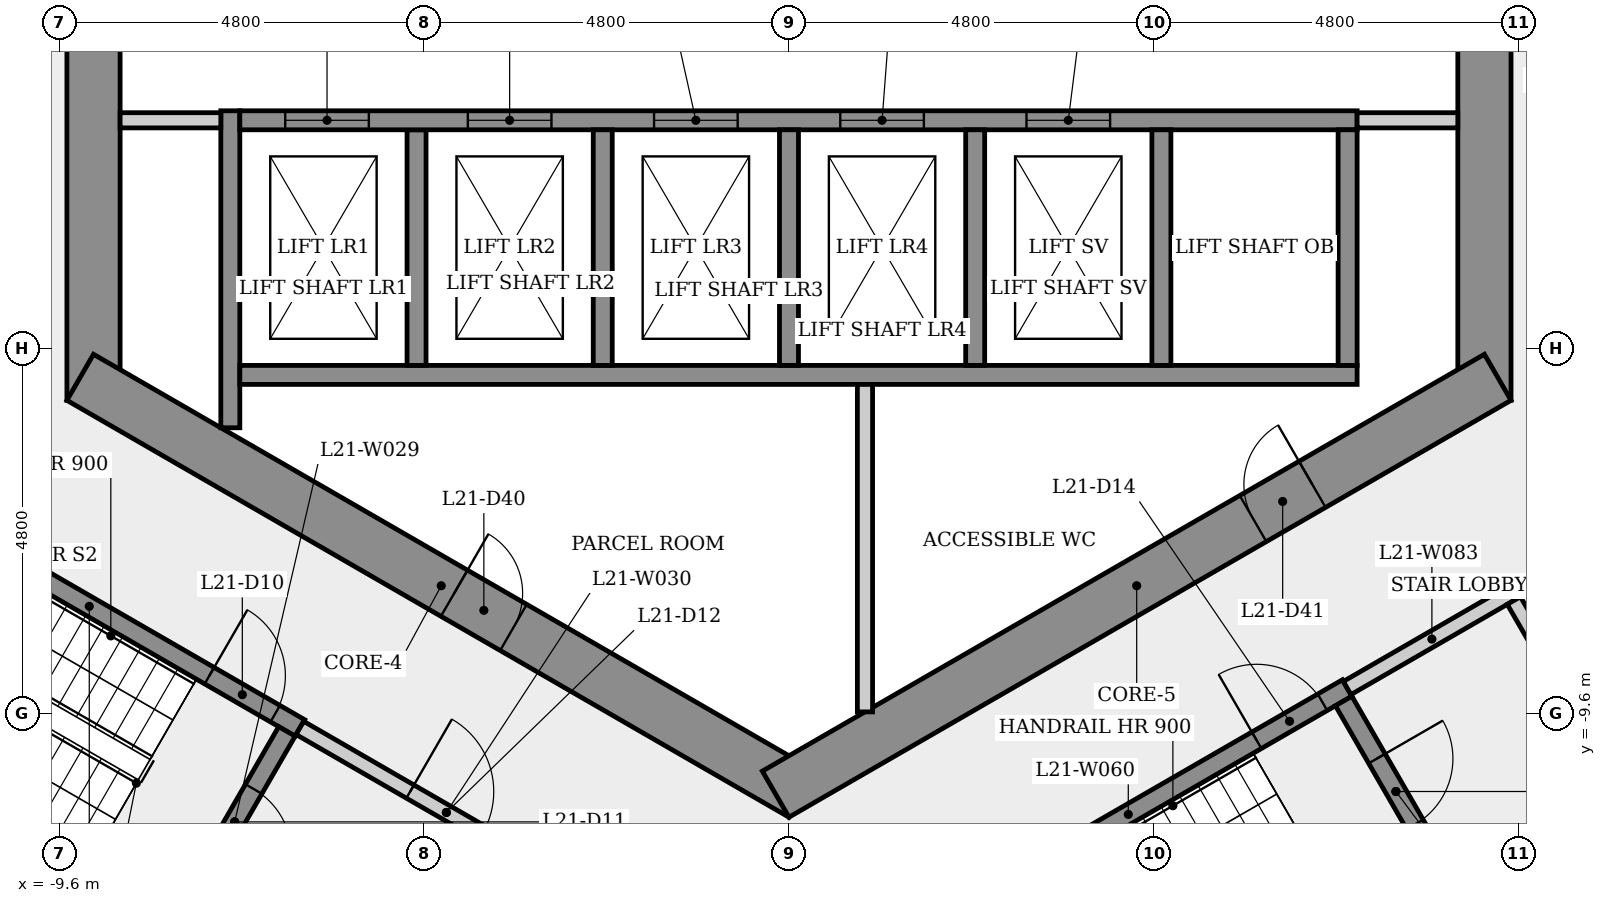
"""IFC4 building model, lengths in metres.
Left out: names, types, materials, properties, quantities, classifications, styles, units other than length and angle.
Written with IfcOpenShell. Run it as: python <this file> out.ifc"""

import sys

from ifc_helpers import new_model, si_unit, direction, frame, frame_2d, origin, place, context, subcontext, project, spatial, rectangle, extrude, element, fill, save


model = new_model("IFC4")
c1 = context("Model", 3, precision=1e-05, world=origin(), true_north=direction((0.0, 1.0)))
c2 = subcontext(c1, "Body", "Model", "MODEL_VIEW")
j1 = project(units=[si_unit("LENGTHUNIT", "METRE"), si_unit("PLANEANGLEUNIT", "RADIAN")], contexts=[c1])
p1 = place(None, origin())
s1 = spatial("IfcSite", under=j1, at=p1, CompositionType="ELEMENT")
p2 = place(p1, origin())
s2 = spatial("IfcBuilding", under=s1, at=p2, CompositionType="ELEMENT")
p3 = place(p2, frame((0.0, 0.0, 83.1)))
s3 = spatial("IfcBuildingStorey", under=s2, at=p3, CompositionType="ELEMENT", Elevation=83.1)
p4 = place(p3, frame((9.15, -5.485, 0.0), z_axis=(0.0, 0.0, 1.0), x_axis=(0.0, 1.0, 0.0)))
e1 = element("IfcWall", 1, at=p4, inside=s3, PredefinedType="SHEAR", context=c2, shape_type="SweptSolid", body=[
    extrude(rectangle(XDim=10.97, YDim=0.7, at=frame_2d((5.485, 0.0))), origin(), (0.0, 0.0, 1.0), 3.4),
])
p5 = place(p4, frame((4.685, 0.0, 0.0)))
e2 = element("IfcOpeningElement", 2, at=p5, cuts=e1, PredefinedType="OPENING", context=c2, shape_type="SweptSolid", body=[
    extrude(rectangle(XDim=1.6, YDim=2.1, at=frame_2d((0.8, 1.05))), frame((0.0, 0.36, 0.0), z_axis=(0.0, -1.0, 0.0), x_axis=(1.0, 0.0, 0.0)), (0.0, 0.0, 1.0), 0.72),
])
p6 = place(p3, frame((-9.15, 5.485, 0.0), z_axis=(0.0, 0.0, 1.0), x_axis=(0.0, -1.0, 0.0)))
e3 = element("IfcWall", 3, at=p6, inside=s3, PredefinedType="SHEAR", context=c2, shape_type="SweptSolid", body=[
    extrude(rectangle(XDim=10.97, YDim=0.7, at=frame_2d((5.485, 0.0))), origin(), (0.0, 0.0, 1.0), 3.4),
])
p7 = place(p6, frame((4.685, 0.0, 0.0)))
e4 = element("IfcOpeningElement", 4, at=p7, cuts=e3, PredefinedType="OPENING", context=c2, shape_type="SweptSolid", body=[
    extrude(rectangle(XDim=1.6, YDim=2.1, at=frame_2d((0.8, 1.05))), frame((0.0, 0.36, 0.0), z_axis=(0.0, -1.0, 0.0), x_axis=(1.0, 0.0, 0.0)), (0.0, 0.0, 1.0), 0.72),
])
p8 = place(p3, frame((-9.325, -5.182, 0.0), z_axis=(0.0, 0.0, 1.0), x_axis=(0.866023993627, -0.500002442456, 0.0)))
e5 = element("IfcWall", 5, at=p8, inside=s3, PredefinedType="SHEAR", context=c2, shape_type="SweptSolid", body=[
    extrude(rectangle(XDim=10.97, YDim=0.7, at=frame_2d((5.485, 0.0))), origin(), (0.0, 0.0, 1.0), 3.4),
])
p9 = place(p8, frame((5.682, 0.0, 0.0)))
e6 = element("IfcOpeningElement", 6, at=p9, cuts=e5, PredefinedType="OPENING", context=c2, shape_type="SweptSolid", body=[
    extrude(rectangle(XDim=0.9, YDim=2.1, at=frame_2d((0.45, 1.05))), frame((0.0, 0.36, 0.0), z_axis=(0.0, -1.0, 0.0), x_axis=(1.0, 0.0, 0.0)), (0.0, 0.0, 1.0), 0.72),
])
p10 = place(p3, frame((-0.175, -10.667, 0.0), z_axis=(0.0, 0.0, 1.0), x_axis=(0.866023993627, 0.500002442456, 0.0)))
e7 = element("IfcWall", 7, at=p10, inside=s3, PredefinedType="SHEAR", context=c2, shape_type="SweptSolid", body=[
    extrude(rectangle(XDim=10.97, YDim=0.7, at=frame_2d((5.485, 0.0))), origin(), (0.0, 0.0, 1.0), 3.4),
])
p11 = place(p10, frame((7.252, 0.0, 0.0)))
e8 = element("IfcOpeningElement", 8, at=p11, cuts=e7, PredefinedType="OPENING", context=c2, shape_type="SweptSolid", body=[
    extrude(rectangle(XDim=0.9, YDim=2.1, at=frame_2d((0.45, 1.05))), frame((0.0, 0.36, 0.0), z_axis=(0.0, -1.0, 0.0), x_axis=(1.0, 0.0, 0.0)), (0.0, 0.0, 1.0), 0.72),
])
p12 = place(p3, frame((-11.977, -6.595, 0.0), z_axis=(0.0, 0.0, 1.0), x_axis=(0.866025499775, -0.499999833739, 0.0)))
e9 = element("IfcWall", 9, at=p12, inside=s3, PredefinedType="SHEAR", context=c2, shape_type="SweptSolid", body=[
    extrude(rectangle(XDim=6.4, YDim=0.25, at=frame_2d((3.2, 0.0))), origin(), (0.0, 0.0, 1.0), 3.05),
])
p13 = place(p12, frame((5.025, 0.0, 0.0)))
e10 = element("IfcOpeningElement", 10, at=p13, cuts=e9, PredefinedType="OPENING", context=c2, shape_type="SweptSolid", body=[
    extrude(rectangle(XDim=1.0, YDim=2.1, at=frame_2d((0.5, 1.05))), frame((0.0, 0.135, 0.0), z_axis=(0.0, -1.0, 0.0), x_axis=(1.0, 0.0, 0.0)), (0.0, 0.0, 1.0), 0.27),
])
p14 = place(p3, frame((-7.935, -12.393, 0.0), z_axis=(0.0, 0.0, 1.0), x_axis=(-0.866025499775, 0.499999833739, 0.0)))
e11 = element("IfcWall", 11, at=p14, inside=s3, PredefinedType="SHEAR", context=c2, shape_type="SweptSolid", body=[
    extrude(rectangle(XDim=6.4, YDim=0.25, at=frame_2d((3.2, 0.0))), origin(), (0.0, 0.0, 1.0), 3.05),
])
p15 = place(p3, frame((-7.35, -5.846, 0.0), z_axis=(0.0, 0.0, 1.0), x_axis=(0.0, 1.0, 0.0)))
e12 = element("IfcWall", 12, at=p15, inside=s3, PredefinedType="SHEAR", context=c2, shape_type="SweptSolid", body=[
    extrude(rectangle(XDim=4.171, YDim=0.25, at=frame_2d((2.085, 0.0))), origin(), (0.0, 0.0, 1.0), 3.05),
])
p16 = place(p3, frame((-7.475, -1.8, 0.0), z_axis=(0.0, 0.0, 1.0), x_axis=(-1.0, 0.0, 0.0)))
e13 = element("IfcWall", 13, at=p16, inside=s3, PredefinedType="PARTITIONING", context=c2, shape_type="SweptSolid", body=[
    extrude(rectangle(XDim=1.325, YDim=0.2, at=frame_2d((0.663, 0.0))), origin(), (0.0, 0.0, 1.0), 3.05),
])
p17 = place(p3, frame((-6.605, -9.841, 0.0), z_axis=(0.0, 0.0, 1.0), x_axis=(-0.499996545922, -0.866027397988, 0.0)))
e14 = element("IfcWall", 14, at=p17, inside=s3, PredefinedType="SHEAR", context=c2, shape_type="SweptSolid", body=[
    extrude(rectangle(XDim=2.75, YDim=0.25, at=frame_2d((1.375, 0.0))), origin(), (0.0, 0.0, 1.0), 3.05),
])
p18 = place(p17, frame((0.875, 0.0, 0.0)))
e15 = element("IfcOpeningElement", 15, at=p18, cuts=e14, PredefinedType="OPENING", context=c2, shape_type="SweptSolid", body=[
    extrude(rectangle(XDim=1.0, YDim=2.1, at=frame_2d((0.5, 1.05))), frame((0.0, 0.135, 0.0), z_axis=(0.0, -1.0, 0.0), x_axis=(1.0, 0.0, 0.0)), (0.0, 0.0, 1.0), 0.27),
])
p19 = place(p3, frame((-6.435, -9.795, 0.0), z_axis=(0.0, 0.0, 1.0), x_axis=(0.866012907634, -0.500021643343, 0.0)))
e16 = element("IfcWall", 16, at=p19, inside=s3, PredefinedType="PARTITIONING", context=c2, shape_type="SweptSolid", body=[
    extrude(rectangle(XDim=4.45, YDim=0.2, at=frame_2d((2.225, 0.0))), origin(), (0.0, 0.0, 1.0), 3.05),
])
p20 = place(p19, frame((1.675, 0.0, 0.0)))
e17 = element("IfcOpeningElement", 17, at=p20, cuts=e16, PredefinedType="OPENING", context=c2, shape_type="SweptSolid", body=[
    extrude(rectangle(XDim=1.1, YDim=2.1, at=frame_2d((0.55, 1.05))), frame((0.0, 0.11, 0.0), z_axis=(0.0, -1.0, 0.0), x_axis=(1.0, 0.0, 0.0)), (0.0, 0.0, 1.0), 0.22),
])
p21 = place(p3, frame((-7.225, -5.15, 0.0), z_axis=(0.0, 0.0, 1.0), x_axis=(1.0, 0.0, 0.0)))
e18 = element("IfcWall", 18, at=p21, inside=s3, PredefinedType="SHEAR", context=c2, shape_type="SweptSolid", body=[
    extrude(rectangle(XDim=14.7, YDim=0.25, at=frame_2d((7.35, 0.0))), origin(), (0.0, 0.0, 1.0), 3.05),
])
p22 = place(p3, frame((-4.9, -1.925, 0.0), z_axis=(0.0, 0.0, 1.0), x_axis=(0.0, -1.0, 0.0)))
e19 = element("IfcWall", 19, at=p22, inside=s3, PredefinedType="SHEAR", context=c2, shape_type="SweptSolid", body=[
    extrude(rectangle(XDim=3.1, YDim=0.25, at=frame_2d((1.55, 0.0))), origin(), (0.0, 0.0, 1.0), 3.4),
])
p23 = place(p3, frame((-7.225, -1.8, 0.0), z_axis=(0.0, 0.0, 1.0), x_axis=(1.0, 0.0, 0.0)))
e20 = element("IfcWall", 20, at=p23, inside=s3, PredefinedType="SHEAR", context=c2, shape_type="SweptSolid", body=[
    extrude(rectangle(XDim=14.7, YDim=0.25, at=frame_2d((7.35, 0.0))), origin(), (0.0, 0.0, 1.0), 3.05),
])
p24 = place(p23, frame((0.597, 0.0, 0.0)))
e21 = element("IfcOpeningElement", 21, at=p24, cuts=e20, PredefinedType="OPENING", context=c2, shape_type="SweptSolid", body=[
    extrude(rectangle(XDim=1.1, YDim=2.1, at=frame_2d((0.55, 1.05))), frame((0.0, 0.135, 0.0), z_axis=(0.0, -1.0, 0.0), x_axis=(1.0, 0.0, 0.0)), (0.0, 0.0, 1.0), 0.27),
])
p25 = place(p23, frame((3.0, 0.0, 0.0)))
e22 = element("IfcOpeningElement", 22, at=p25, cuts=e20, PredefinedType="OPENING", context=c2, shape_type="SweptSolid", body=[
    extrude(rectangle(XDim=1.1, YDim=2.1, at=frame_2d((0.55, 1.05))), frame((0.0, 0.135, 0.0), z_axis=(0.0, -1.0, 0.0), x_axis=(1.0, 0.0, 0.0)), (0.0, 0.0, 1.0), 0.27),
])
p26 = place(p23, frame((5.45, 0.0, 0.0)))
e23 = element("IfcOpeningElement", 23, at=p26, cuts=e20, PredefinedType="OPENING", context=c2, shape_type="SweptSolid", body=[
    extrude(rectangle(XDim=1.1, YDim=2.1, at=frame_2d((0.55, 1.05))), frame((0.0, 0.135, 0.0), z_axis=(0.0, -1.0, 0.0), x_axis=(1.0, 0.0, 0.0)), (0.0, 0.0, 1.0), 0.27),
])
p27 = place(p23, frame((7.9, 0.0, 0.0)))
e24 = element("IfcOpeningElement", 24, at=p27, cuts=e20, PredefinedType="OPENING", context=c2, shape_type="SweptSolid", body=[
    extrude(rectangle(XDim=1.1, YDim=2.1, at=frame_2d((0.55, 1.05))), frame((0.0, 0.135, 0.0), z_axis=(0.0, -1.0, 0.0), x_axis=(1.0, 0.0, 0.0)), (0.0, 0.0, 1.0), 0.27),
])
p28 = place(p23, frame((10.35, 0.0, 0.0)))
e25 = element("IfcOpeningElement", 25, at=p28, cuts=e20, PredefinedType="OPENING", context=c2, shape_type="SweptSolid", body=[
    extrude(rectangle(XDim=1.1, YDim=2.1, at=frame_2d((0.55, 1.05))), frame((0.0, 0.135, 0.0), z_axis=(0.0, -1.0, 0.0), x_axis=(1.0, 0.0, 0.0)), (0.0, 0.0, 1.0), 0.27),
])
for number, where, z_axis, x_axis in (
    (26, (-2.45, -1.925, 0.0), (0.0, 0.0, 1.0), (0.0, -1.0, 0.0)),
    (27, (0.0, -1.925, 0.0), (0.0, 0.0, 1.0), (0.0, -1.0, 0.0)),
):
    element("IfcWall", number, at=place(p3, frame(where, z_axis=z_axis, x_axis=x_axis)), inside=s3, PredefinedType="SHEAR", context=c2, shape_type="SweptSolid", body=[
        extrude(rectangle(XDim=3.1, YDim=0.25, at=frame_2d((1.55, 0.0))), origin(), (0.0, 0.0, 1.0), 3.4),
    ])
p29 = place(p3, frame((1.0, -5.275, 0.0), z_axis=(0.0, 0.0, 1.0), x_axis=(0.0, -1.0, 0.0)))
e28 = element("IfcWall", 28, at=p29, inside=s3, PredefinedType="PARTITIONING", context=c2, shape_type="SweptSolid", body=[
    extrude(rectangle(XDim=4.309, YDim=0.2, at=frame_2d((2.155, 0.0))), origin(), (0.0, 0.0, 1.0), 3.05),
])
p30 = place(p3, frame((1.585, -12.595, 0.0), z_axis=(0.0, 0.0, 1.0), x_axis=(0.866036417653, 0.499980922934, 0.0)))
e29 = element("IfcWall", 29, at=p30, inside=s3, PredefinedType="SHEAR", context=c2, shape_type="SweptSolid", body=[
    extrude(rectangle(XDim=6.65, YDim=0.25, at=frame_2d((3.325, 0.0))), origin(), (0.0, 0.0, 1.0), 3.05),
])
p31 = place(p30, frame((5.275, 0.0, 0.0)))
e30 = element("IfcOpeningElement", 30, at=p31, cuts=e29, PredefinedType="OPENING", context=c2, shape_type="SweptSolid", body=[
    extrude(rectangle(XDim=1.0, YDim=2.1, at=frame_2d((0.5, 1.05))), frame((0.0, 0.135, 0.0), z_axis=(0.0, -1.0, 0.0), x_axis=(1.0, 0.0, 0.0)), (0.0, 0.0, 1.0), 0.27),
])
for number, where, z_axis, x_axis in (
    (31, (2.45, -1.925, 0.0), (0.0, 0.0, 1.0), (0.0, -1.0, 0.0)),
    (32, (4.9, -1.925, 0.0), (0.0, 0.0, 1.0), (0.0, -1.0, 0.0)),
):
    element("IfcWall", number, at=place(p3, frame(where, z_axis=z_axis, x_axis=x_axis)), inside=s3, PredefinedType="SHEAR", context=c2, shape_type="SweptSolid", body=[
        extrude(rectangle(XDim=3.1, YDim=0.25, at=frame_2d((1.55, 0.0))), origin(), (0.0, 0.0, 1.0), 3.4),
    ])
p32 = place(p3, frame((7.298, -9.441, 0.0), z_axis=(0.0, 0.0, 1.0), x_axis=(0.500034990121, -0.866005201286, 0.0)))
e33 = element("IfcWall", 33, at=p32, inside=s3, PredefinedType="SHEAR", context=c2, shape_type="SweptSolid", body=[
    extrude(rectangle(XDim=2.75, YDim=0.25, at=frame_2d((1.375, 0.0))), origin(), (0.0, 0.0, 1.0), 3.05),
])
p33 = place(p32, frame((0.875, 0.0, 0.0)))
e34 = element("IfcOpeningElement", 34, at=p33, cuts=e33, PredefinedType="OPENING", context=c2, shape_type="SweptSolid", body=[
    extrude(rectangle(XDim=1.0, YDim=2.1, at=frame_2d((0.5, 1.05))), frame((0.0, 0.135, 0.0), z_axis=(0.0, -1.0, 0.0), x_axis=(1.0, 0.0, 0.0)), (0.0, 0.0, 1.0), 0.27),
])
p34 = place(p3, frame((7.344, -9.27, 0.0), z_axis=(0.0, 0.0, 1.0), x_axis=(0.866005588531, 0.500034319456, 0.0)))
e35 = element("IfcWall", 35, at=p34, inside=s3, PredefinedType="PARTITIONING", context=c2, shape_type="SweptSolid", body=[
    extrude(rectangle(XDim=2.575, YDim=0.2, at=frame_2d((1.288, 0.0))), origin(), (0.0, 0.0, 1.0), 3.05),
])
p35 = place(p3, frame((7.35, -1.925, 0.0), z_axis=(0.0, 0.0, 1.0), x_axis=(0.0, -1.0, 0.0)))
e36 = element("IfcWall", 36, at=p35, inside=s3, PredefinedType="SHEAR", context=c2, shape_type="SweptSolid", body=[
    extrude(rectangle(XDim=3.1, YDim=0.25, at=frame_2d((1.55, 0.0))), origin(), (0.0, 0.0, 1.0), 3.4),
])
p36 = place(p3, frame((8.8, -1.8, 0.0), z_axis=(0.0, 0.0, 1.0), x_axis=(-1.0, 0.0, 0.0)))
e37 = element("IfcWall", 37, at=p36, inside=s3, PredefinedType="PARTITIONING", context=c2, shape_type="SweptSolid", body=[
    extrude(rectangle(XDim=1.325, YDim=0.2, at=frame_2d((0.663, 0.0))), origin(), (0.0, 0.0, 1.0), 3.05),
])
p37 = place(p3, frame((9.537, -8.119, 0.0), z_axis=(0.0, 0.0, 1.0), x_axis=(0.499990139034, -0.866031096941, 0.0)))
e38 = element("IfcWall", 38, at=p37, inside=s3, PredefinedType="PARTITIONING", context=c2, shape_type="SweptSolid", body=[
    extrude(rectangle(XDim=3.0, YDim=0.2, at=frame_2d((1.5, 0.0))), origin(), (0.0, 0.0, 1.0), 3.05),
])
p38 = place(p37, frame((0.935, 0.0, 0.0)))
e39 = element("IfcOpeningElement", 39, at=p38, cuts=e38, PredefinedType="OPENING", context=c2, shape_type="SweptSolid", body=[
    extrude(rectangle(XDim=1.0, YDim=2.1, at=frame_2d((0.5, 1.05))), frame((0.0, 0.11, 0.0), z_axis=(0.0, -1.0, 0.0), x_axis=(1.0, 0.0, 0.0)), (0.0, 0.0, 1.0), 0.22),
])
p39 = place(p3, frame((10.901, -10.681, 0.0), z_axis=(0.0, 0.0, 1.0), x_axis=(-0.866007538022, -0.500030943131, 0.0)))
e40 = element("IfcWall", 40, at=p39, inside=s3, PredefinedType="PARTITIONING", context=c2, shape_type="SweptSolid", body=[
    extrude(rectangle(XDim=2.375, YDim=0.2, at=frame_2d((1.188, 0.0))), origin(), (0.0, 0.0, 1.0), 3.05),
])
p40 = place(p24, origin())
e41 = element("IfcDoor", 41, at=p40, inside=s3, OperationType="SLIDING_TO_LEFT", PredefinedType="DOOR", context=c2, shape_type="SweptSolid", body=[
    extrude(rectangle(XDim=1.1, YDim=2.1, at=frame_2d((0.55, 1.05))), frame((0.0, 0.025, 0.0), z_axis=(0.0, -1.0, 0.0), x_axis=(1.0, 0.0, 0.0)), (0.0, 0.0, 1.0), 0.05),
])
fill(e21, e41)
p41 = place(p25, origin())
e42 = element("IfcDoor", 42, at=p41, inside=s3, OperationType="SLIDING_TO_LEFT", PredefinedType="DOOR", context=c2, shape_type="SweptSolid", body=[
    extrude(rectangle(XDim=1.1, YDim=2.1, at=frame_2d((0.55, 1.05))), frame((0.0, 0.025, 0.0), z_axis=(0.0, -1.0, 0.0), x_axis=(1.0, 0.0, 0.0)), (0.0, 0.0, 1.0), 0.05),
])
fill(e22, e42)
p42 = place(p26, origin())
e43 = element("IfcDoor", 43, at=p42, inside=s3, OperationType="SLIDING_TO_LEFT", PredefinedType="DOOR", context=c2, shape_type="SweptSolid", body=[
    extrude(rectangle(XDim=1.1, YDim=2.1, at=frame_2d((0.55, 1.05))), frame((0.0, 0.025, 0.0), z_axis=(0.0, -1.0, 0.0), x_axis=(1.0, 0.0, 0.0)), (0.0, 0.0, 1.0), 0.05),
])
fill(e23, e43)
p43 = place(p27, origin())
e44 = element("IfcDoor", 44, at=p43, inside=s3, OperationType="SLIDING_TO_LEFT", PredefinedType="DOOR", context=c2, shape_type="SweptSolid", body=[
    extrude(rectangle(XDim=1.1, YDim=2.1, at=frame_2d((0.55, 1.05))), frame((0.0, 0.025, 0.0), z_axis=(0.0, -1.0, 0.0), x_axis=(1.0, 0.0, 0.0)), (0.0, 0.0, 1.0), 0.05),
])
fill(e24, e44)
p44 = place(p28, origin())
e45 = element("IfcDoor", 45, at=p44, inside=s3, OperationType="SLIDING_TO_LEFT", PredefinedType="DOOR", context=c2, shape_type="SweptSolid", body=[
    extrude(rectangle(XDim=1.1, YDim=2.1, at=frame_2d((0.55, 1.05))), frame((0.0, 0.025, 0.0), z_axis=(0.0, -1.0, 0.0), x_axis=(1.0, 0.0, 0.0)), (0.0, 0.0, 1.0), 0.05),
])
fill(e25, e45)
p45 = place(p13, origin())
e46 = element("IfcDoor", 46, at=p45, inside=s3, OperationType="SINGLE_SWING_LEFT", PredefinedType="DOOR", context=c2, shape_type="SweptSolid", body=[
    extrude(rectangle(XDim=1.0, YDim=2.1, at=frame_2d((0.5, 1.05))), frame((0.0, 0.025, 0.0), z_axis=(0.0, -1.0, 0.0), x_axis=(1.0, 0.0, 0.0)), (0.0, 0.0, 1.0), 0.05),
])
fill(e10, e46)
p46 = place(p18, origin())
e47 = element("IfcDoor", 47, at=p46, inside=s3, OperationType="SINGLE_SWING_RIGHT", PredefinedType="DOOR", context=c2, shape_type="SweptSolid", body=[
    extrude(rectangle(XDim=1.0, YDim=2.1, at=frame_2d((0.5, 1.05))), frame((0.0, 0.025, 0.0), z_axis=(0.0, -1.0, 0.0), x_axis=(1.0, 0.0, 0.0)), (0.0, 0.0, 1.0), 0.05),
])
fill(e15, e47)
p47 = place(p20, origin())
e48 = element("IfcDoor", 48, at=p47, inside=s3, OperationType="SINGLE_SWING_LEFT", PredefinedType="DOOR", context=c2, shape_type="SweptSolid", body=[
    extrude(rectangle(XDim=1.1, YDim=2.1, at=frame_2d((0.55, 1.05))), frame((0.0, 0.025, 0.0), z_axis=(0.0, -1.0, 0.0), x_axis=(1.0, 0.0, 0.0)), (0.0, 0.0, 1.0), 0.05),
])
fill(e17, e48)
p48 = place(p31, origin())
e49 = element("IfcDoor", 49, at=p48, inside=s3, OperationType="SINGLE_SWING_LEFT", PredefinedType="DOOR", context=c2, shape_type="SweptSolid", body=[
    extrude(rectangle(XDim=1.0, YDim=2.1, at=frame_2d((0.5, 1.05))), frame((0.0, 0.025, 0.0), z_axis=(0.0, -1.0, 0.0), x_axis=(1.0, 0.0, 0.0)), (0.0, 0.0, 1.0), 0.05),
])
fill(e30, e49)
p49 = place(p33, origin())
e50 = element("IfcDoor", 50, at=p49, inside=s3, OperationType="SINGLE_SWING_LEFT", PredefinedType="DOOR", context=c2, shape_type="SweptSolid", body=[
    extrude(rectangle(XDim=1.0, YDim=2.1, at=frame_2d((0.5, 1.05))), frame((0.0, 0.025, 0.0), z_axis=(0.0, -1.0, 0.0), x_axis=(1.0, 0.0, 0.0)), (0.0, 0.0, 1.0), 0.05),
])
fill(e34, e50)
p50 = place(p9, origin())
e51 = element("IfcDoor", 51, at=p50, inside=s3, OperationType="SINGLE_SWING_LEFT", PredefinedType="DOOR", context=c2, shape_type="SweptSolid", body=[
    extrude(rectangle(XDim=0.9, YDim=2.1, at=frame_2d((0.45, 1.05))), frame((0.0, 0.025, 0.0), z_axis=(0.0, -1.0, 0.0), x_axis=(1.0, 0.0, 0.0)), (0.0, 0.0, 1.0), 0.05),
])
fill(e6, e51)
p51 = place(p11, origin())
e52 = element("IfcDoor", 52, at=p51, inside=s3, OperationType="SINGLE_SWING_RIGHT", PredefinedType="DOOR", context=c2, shape_type="SweptSolid", body=[
    extrude(rectangle(XDim=0.9, YDim=2.1, at=frame_2d((0.45, 1.05))), frame((0.0, 0.025, 0.0), z_axis=(0.0, -1.0, 0.0), x_axis=(1.0, 0.0, 0.0)), (0.0, 0.0, 1.0), 0.05),
])
fill(e8, e52)
save(model, sys.argv[1])
